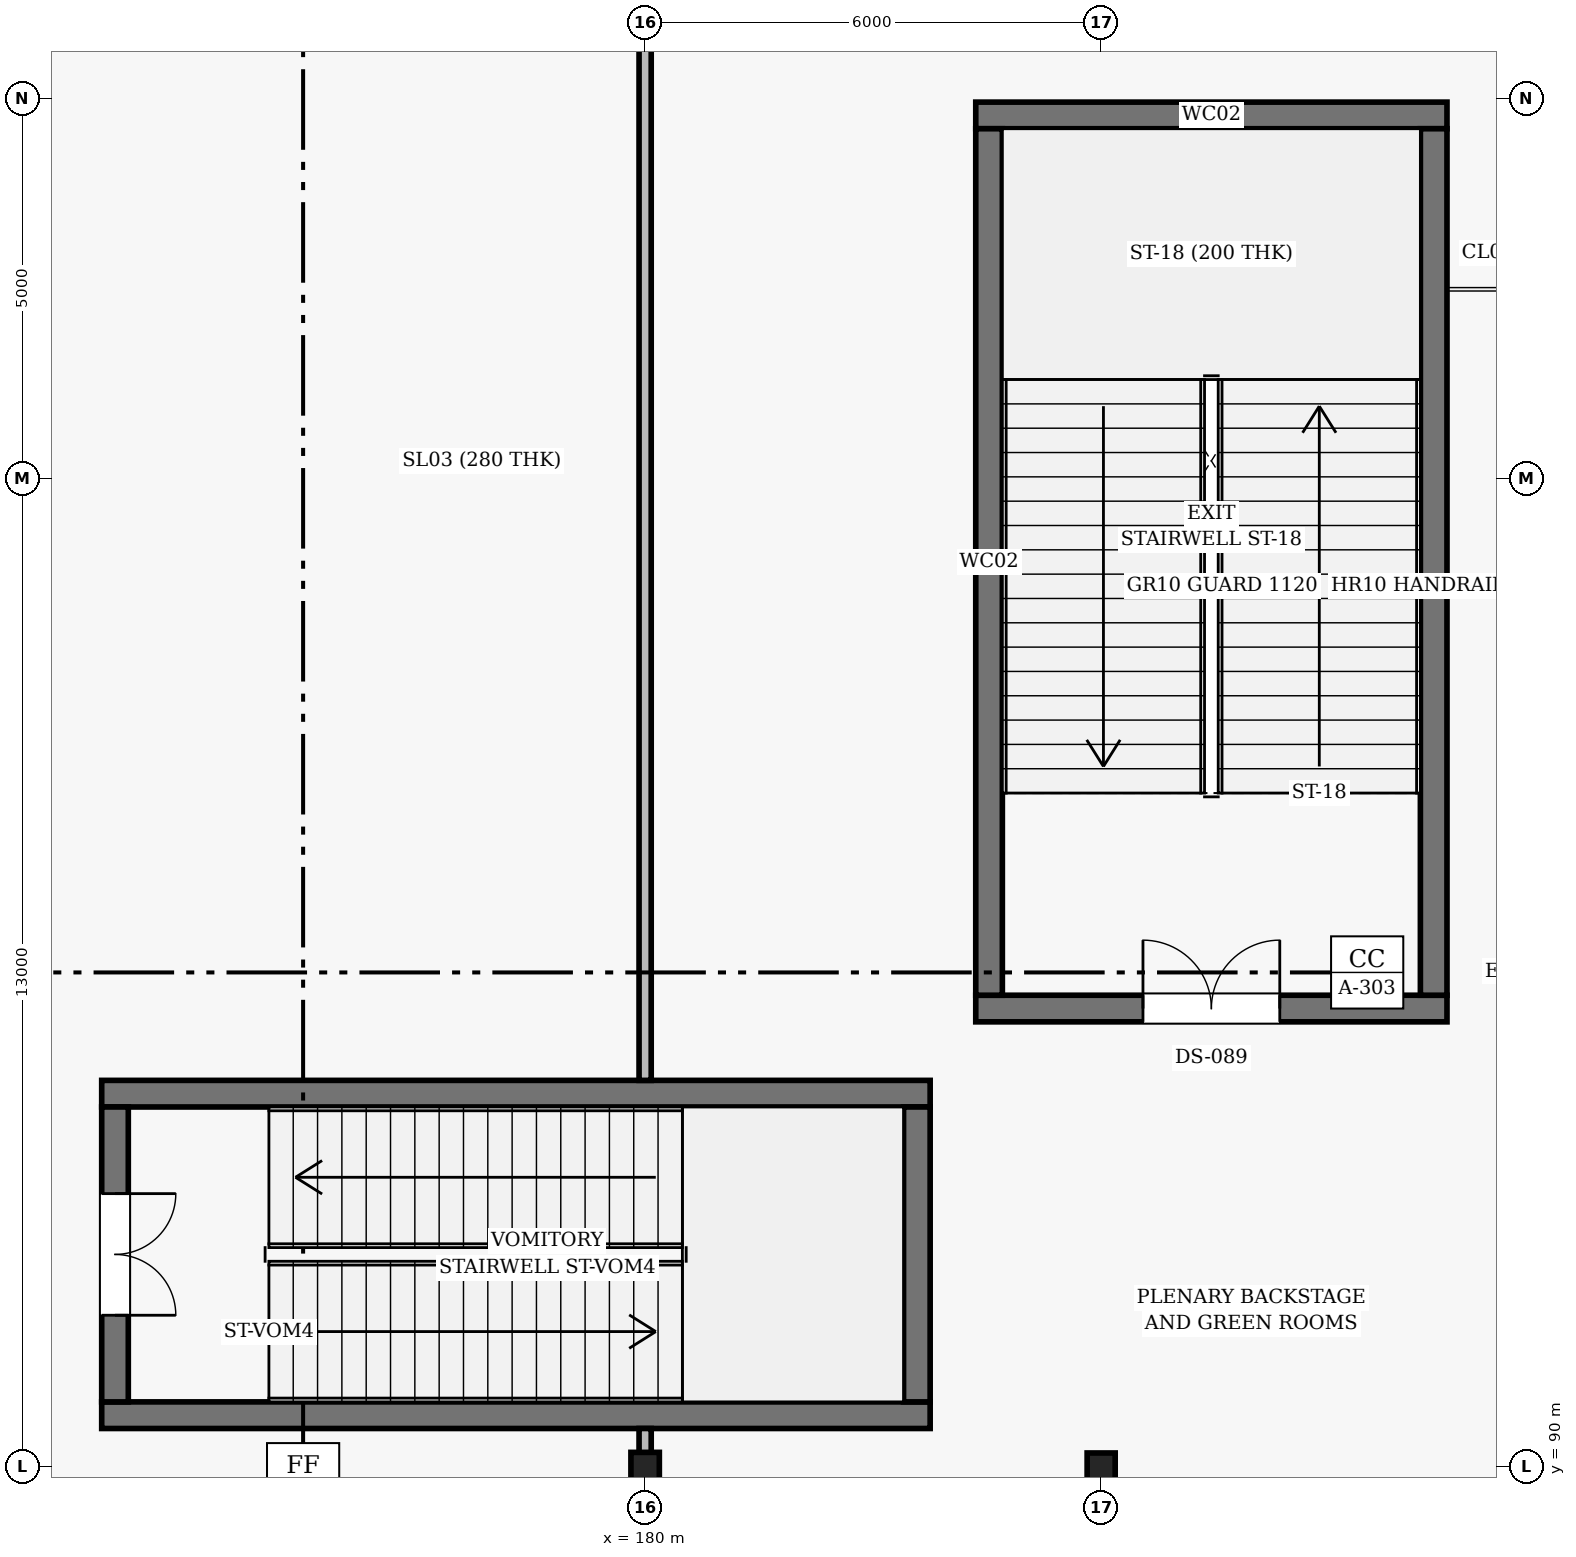
"""IFC4 building model, lengths in metres.
Left out: names, types, materials, properties, quantities, classifications, styles, units other than length and angle.
Written with IfcOpenShell. Run it as: python <this file> out.ifc"""

import sys

from ifc_helpers import new_model, si_unit, direction, frame, frame_2d, origin, origin_2d, place, context, subcontext, project, spatial, rectangle, i_section, extrude, element, fill, save


model = new_model("IFC4")
c1 = context("Model", 3, precision=1e-05, world=origin(), true_north=direction((0.0, 1.0)))
c2 = subcontext(c1, "Body", "Model", "MODEL_VIEW")
j1 = project(units=[si_unit("LENGTHUNIT", "METRE"), si_unit("PLANEANGLEUNIT", "RADIAN")], contexts=[c1])
p1 = place(None, origin())
s1 = spatial("IfcSite", under=j1, at=p1, CompositionType="ELEMENT")
p2 = place(p1, origin())
s2 = spatial("IfcBuilding", under=s1, at=p2, CompositionType="ELEMENT")
p3 = place(p2, origin())
s3 = spatial("IfcBuildingStorey", under=s2, at=p3, CompositionType="ELEMENT", Elevation=0.0)
p4 = place(p3, frame((180.0, 90.0, 0.0), z_axis=(0.0, 0.0, 1.0), x_axis=(1.0, 0.0, 0.0)))
e1 = element("IfcColumn", 1, at=p4, inside=s3, PredefinedType="COLUMN", context=c2, shape_type="SweptSolid", body=[
    extrude(i_section(OverallWidth=0.374, OverallDepth=0.372, WebThickness=0.016, FlangeThickness=0.026, FilletRadius=0.016, at=origin_2d()), origin(), (0.0, 0.0, 1.0), 5.4),
])
p5 = place(p3, frame((186.0, 90.0, 0.0), z_axis=(0.0, 0.0, 1.0), x_axis=(1.0, 0.0, 0.0)))
e2 = element("IfcColumn", 2, at=p5, inside=s3, PredefinedType="COLUMN", context=c2, shape_type="SweptSolid", body=[
    extrude(i_section(OverallWidth=0.369, OverallDepth=0.356, WebThickness=0.011, FlangeThickness=0.018, FilletRadius=0.015, at=origin_2d()), origin(), (0.0, 0.0, 1.0), 5.4),
])
p6 = place(p3, frame((184.35, 96.025, 0.0), z_axis=(0.0, 0.0, 1.0), x_axis=(1.0, 0.0, 0.0)))
e3 = element("IfcWall", 3, at=p6, inside=s3, PredefinedType="SHEAR", context=c2, shape_type="SweptSolid", body=[
    extrude(rectangle(XDim=6.2, YDim=0.35, at=frame_2d((3.1, 0.0))), origin(), (0.0, 0.0, 1.0), 5.16),
])
p7 = place(p6, frame((2.2, 0.0, 0.0)))
e4 = element("IfcOpeningElement", 4, at=p7, cuts=e3, PredefinedType="OPENING", context=c2, shape_type="SweptSolid", body=[
    extrude(rectangle(XDim=1.8, YDim=2.2, at=frame_2d((0.9, 1.1))), frame((0.0, 0.185, 0.0), z_axis=(0.0, -1.0, 0.0), x_axis=(1.0, 0.0, 0.0)), (0.0, 0.0, 1.0), 0.37),
])
p8 = place(p3, frame((190.55, 107.775, 0.0), z_axis=(0.0, 0.0, 1.0), x_axis=(-1.0, 0.0, 0.0)))
e5 = element("IfcWall", 5, at=p8, inside=s3, PredefinedType="SHEAR", context=c2, shape_type="SweptSolid", body=[
    extrude(rectangle(XDim=6.2, YDim=0.35, at=frame_2d((3.1, 0.0))), origin(), (0.0, 0.0, 1.0), 5.16),
])
for number, where, z_axis, x_axis in (
    (6, (184.525, 107.6, 0.0), (0.0, 0.0, 1.0), (0.0, -1.0, 0.0)),
    (7, (190.375, 96.2, 0.0), (0.0, 0.0, 1.0), (0.0, 1.0, 0.0)),
):
    element("IfcWall", number, at=place(p3, frame(where, z_axis=z_axis, x_axis=x_axis)), inside=s3, PredefinedType="SHEAR", context=c2, shape_type="SweptSolid", body=[
        extrude(rectangle(XDim=11.4, YDim=0.35, at=frame_2d((5.7, 0.0))), origin(), (0.0, 0.0, 1.0), 5.16),
    ])
for number, where, z_axis, x_axis in (
    (8, (172.85, 90.675, 0.0), (0.0, 0.0, 1.0), (1.0, 0.0, 0.0)),
    (9, (183.75, 94.905, 0.0), (0.0, 0.0, 1.0), (-1.0, 0.0, 0.0)),
):
    element("IfcWall", number, at=place(p3, frame(where, z_axis=z_axis, x_axis=x_axis)), inside=s3, PredefinedType="SHEAR", context=c2, shape_type="SweptSolid", body=[
        extrude(rectangle(XDim=10.9, YDim=0.35, at=frame_2d((5.45, 0.0))), origin(), (0.0, 0.0, 1.0), 5.16),
    ])
p9 = place(p3, frame((173.025, 94.73, 0.0), z_axis=(0.0, 0.0, 1.0), x_axis=(0.0, -1.0, 0.0)))
e10 = element("IfcWall", 10, at=p9, inside=s3, PredefinedType="SHEAR", context=c2, shape_type="SweptSolid", body=[
    extrude(rectangle(XDim=3.88, YDim=0.35, at=frame_2d((1.94, 0.0))), origin(), (0.0, 0.0, 1.0), 5.16),
])
p10 = place(p9, frame((1.14, 0.0, 0.0)))
e11 = element("IfcOpeningElement", 11, at=p10, cuts=e10, PredefinedType="OPENING", context=c2, shape_type="SweptSolid", body=[
    extrude(rectangle(XDim=1.6, YDim=2.2, at=frame_2d((0.8, 1.1))), frame((0.0, 0.185, 0.0), z_axis=(0.0, -1.0, 0.0), x_axis=(1.0, 0.0, 0.0)), (0.0, 0.0, 1.0), 0.37),
])
p11 = place(p3, frame((183.575, 90.85, 0.0), z_axis=(0.0, 0.0, 1.0), x_axis=(0.0, 1.0, 0.0)))
e12 = element("IfcWall", 12, at=p11, inside=s3, PredefinedType="SHEAR", context=c2, shape_type="SweptSolid", body=[
    extrude(rectangle(XDim=3.88, YDim=0.35, at=frame_2d((1.94, 0.0))), origin(), (0.0, 0.0, 1.0), 5.16),
])
p12 = place(p3, frame((180.0, 88.5, 0.0), z_axis=(0.0, 0.0, 1.0), x_axis=(0.0, 1.0, 0.0)))
e13 = element("IfcWall", 13, at=p12, inside=s3, PredefinedType="PARTITIONING", context=c2, shape_type="SweptSolid", body=[
    extrude(rectangle(XDim=2.0, YDim=0.16, at=frame_2d((1.0, 0.0))), origin(), (0.0, 0.0, 1.0), 4.461),
])
p13 = place(p3, frame((180.0, 95.08, 0.0), z_axis=(0.0, 0.0, 1.0), x_axis=(0.0, 1.0, 0.0)))
e14 = element("IfcWall", 14, at=p13, inside=s3, PredefinedType="PARTITIONING", context=c2, shape_type="SweptSolid", body=[
    extrude(rectangle(XDim=30.71, YDim=0.16, at=frame_2d((15.355, 0.0))), origin(), (0.0, 0.0, 1.0), 4.606),
])
p14 = place(p13, frame((14.23, 0.0, 0.0)))
e15 = element("IfcOpeningElement", 15, at=p14, cuts=e14, PredefinedType="OPENING", context=c2, shape_type="SweptSolid", body=[
    extrude(rectangle(XDim=2.25, YDim=2.4, at=frame_2d((1.125, 1.2))), frame((0.0, 0.09, 0.0), z_axis=(0.0, -1.0, 0.0), x_axis=(1.0, 0.0, 0.0)), (0.0, 0.0, 1.0), 0.18),
])
p15 = place(p7, origin())
e16 = element("IfcDoor", 16, at=p15, inside=s3, OperationType="DOUBLE_DOOR_SINGLE_SWING", PredefinedType="DOOR", context=c2, shape_type="SweptSolid", body=[
    extrude(rectangle(XDim=1.8, YDim=2.2, at=frame_2d((0.9, 1.1))), frame((0.0, 0.025, 0.0), z_axis=(0.0, -1.0, 0.0), x_axis=(1.0, 0.0, 0.0)), (0.0, 0.0, 1.0), 0.05),
])
fill(e4, e16)
p16 = place(p10, origin())
e17 = element("IfcDoor", 17, at=p16, inside=s3, OperationType="DOUBLE_DOOR_SINGLE_SWING", PredefinedType="DOOR", context=c2, shape_type="SweptSolid", body=[
    extrude(rectangle(XDim=1.6, YDim=2.2, at=frame_2d((0.8, 1.1))), frame((0.0, 0.025, 0.0), z_axis=(0.0, -1.0, 0.0), x_axis=(1.0, 0.0, 0.0)), (0.0, 0.0, 1.0), 0.05),
])
fill(e11, e17)
save(model, sys.argv[1])
